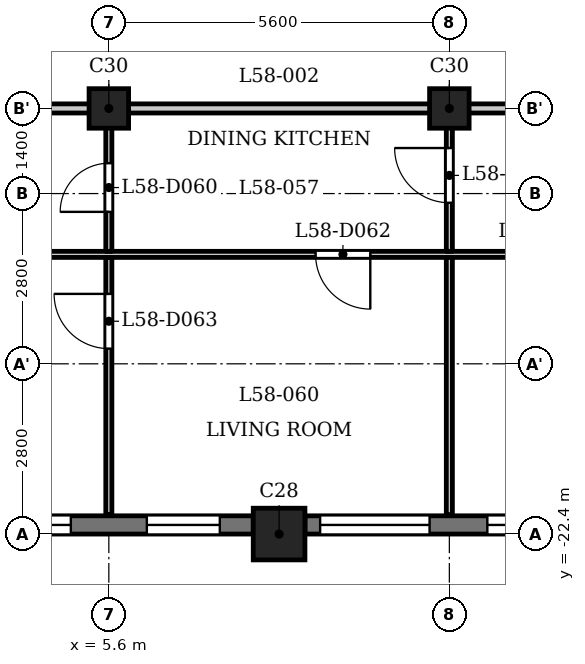
"""IFC4 building model, lengths in metres.
Left out: names, types, materials, properties, quantities, classifications, styles, units other than length and angle.
Written with IfcOpenShell. Run it as: python <this file> out.ifc"""

import sys

from ifc_helpers import new_model, si_unit, direction, frame, frame_2d, origin, origin_2d, place, context, subcontext, project, spatial, rectangle, extrude, element, fill, save


model = new_model("IFC4")
c1 = context("Model", 3, precision=1e-05, world=origin(), true_north=direction((0.0, 1.0)))
c2 = subcontext(c1, "Body", "Model", "MODEL_VIEW")
j1 = project(units=[si_unit("LENGTHUNIT", "METRE"), si_unit("PLANEANGLEUNIT", "RADIAN")], contexts=[c1])
p1 = place(None, origin())
s1 = spatial("IfcSite", under=j1, at=p1, CompositionType="ELEMENT")
p2 = place(p1, origin())
s2 = spatial("IfcBuilding", under=s1, at=p2, CompositionType="ELEMENT")
p3 = place(p2, frame((0.0, 0.0, 223.9)))
s3 = spatial("IfcBuildingStorey", under=s2, at=p3, CompositionType="ELEMENT", Elevation=223.9)
p4 = place(p3, frame((8.4, -22.4, 0.0), z_axis=(0.0, 0.0, 1.0), x_axis=(1.0, 0.0, 0.0)))
e1 = element("IfcColumn", 1, at=p4, inside=s3, PredefinedType="COLUMN", context=c2, shape_type="SweptSolid", body=[
    extrude(rectangle(XDim=0.85, YDim=0.85, at=origin_2d()), origin(), (0.0, 0.0, 1.0), 3.5),
])
for number, where, z_axis, x_axis in (
    (2, (5.6, -15.4, 0.0), (0.0, 0.0, 1.0), (1.0, 0.0, 0.0)),
    (3, (11.2, -15.4, 0.0), (0.0, 0.0, 1.0), (1.0, 0.0, 0.0)),
):
    element("IfcColumn", number, at=place(p3, frame(where, z_axis=z_axis, x_axis=x_axis)), inside=s3, PredefinedType="COLUMN", context=c2, shape_type="SweptSolid", body=[
        extrude(rectangle(XDim=0.65, YDim=0.65, at=origin_2d()), origin(), (0.0, 0.0, 1.0), 3.5),
    ])
p5 = place(p3, frame((3.225, -22.25, 0.0), z_axis=(0.0, 0.0, 1.0), x_axis=(1.0, 0.0, 0.0)))
e4 = element("IfcWall", 4, at=p5, inside=s3, PredefinedType="SOLIDWALL", context=c2, shape_type="SweptSolid", body=[
    extrude(rectangle(XDim=4.75, YDim=0.3, at=frame_2d((2.375, 0.0))), origin(), (0.0, 0.0, 1.0), 2.5),
])
p6 = place(p5, frame((0.55, 0.0, 0.6)))
e5 = element("IfcOpeningElement", 5, at=p6, cuts=e4, PredefinedType="OPENING", context=c2, shape_type="SweptSolid", body=[
    extrude(rectangle(XDim=1.2, YDim=1.55, at=frame_2d((0.6, 0.775))), frame((0.0, 0.16, 0.0), z_axis=(0.0, -1.0, 0.0), x_axis=(1.0, 0.0, 0.0)), (0.0, 0.0, 1.0), 0.32),
])
p7 = place(p5, frame((3.0, 0.0, 0.6)))
e6 = element("IfcOpeningElement", 6, at=p7, cuts=e4, PredefinedType="OPENING", context=c2, shape_type="SweptSolid", body=[
    extrude(rectangle(XDim=1.2, YDim=1.55, at=frame_2d((0.6, 0.775))), frame((0.0, 0.16, 0.0), z_axis=(0.0, -1.0, 0.0), x_axis=(1.0, 0.0, 0.0)), (0.0, 0.0, 1.0), 0.32),
])
p8 = place(p3, frame((8.825, -22.25, 0.0), z_axis=(0.0, 0.0, 1.0), x_axis=(1.0, 0.0, 0.0)))
e7 = element("IfcWall", 7, at=p8, inside=s3, PredefinedType="SOLIDWALL", context=c2, shape_type="SweptSolid", body=[
    extrude(rectangle(XDim=4.75, YDim=0.3, at=frame_2d((2.375, 0.0))), origin(), (0.0, 0.0, 1.0), 2.5),
])
p9 = place(p8, frame((0.25, 0.0, 0.9)))
e8 = element("IfcOpeningElement", 8, at=p9, cuts=e7, PredefinedType="OPENING", context=c2, shape_type="SweptSolid", body=[
    extrude(rectangle(XDim=1.8, YDim=1.25, at=frame_2d((0.9, 0.625))), frame((0.0, 0.16, 0.0), z_axis=(0.0, -1.0, 0.0), x_axis=(1.0, 0.0, 0.0)), (0.0, 0.0, 1.0), 0.32),
])
p10 = place(p8, frame((3.0, 0.0, 0.6)))
e9 = element("IfcOpeningElement", 9, at=p10, cuts=e7, PredefinedType="OPENING", context=c2, shape_type="SweptSolid", body=[
    extrude(rectangle(XDim=1.2, YDim=1.55, at=frame_2d((0.6, 0.775))), frame((0.0, 0.16, 0.0), z_axis=(0.0, -1.0, 0.0), x_axis=(1.0, 0.0, 0.0)), (0.0, 0.0, 1.0), 0.32),
])
p11 = place(p3, frame((-23.594, -17.8, 0.0), z_axis=(0.0, 0.0, 1.0), x_axis=(1.0, 0.0, 0.0)))
e10 = element("IfcWall", 10, at=p11, inside=s3, PredefinedType="PARTITIONING", context=c2, shape_type="SweptSolid", body=[
    extrude(rectangle(XDim=47.188, YDim=0.1, at=frame_2d((23.594, 0.0))), origin(), (0.0, 0.0, 1.0), 3.2),
])
p12 = place(p11, frame((5.094, 0.0, 0.0)))
e11 = element("IfcOpeningElement", 11, at=p12, cuts=e10, PredefinedType="OPENING", context=c2, shape_type="SweptSolid", body=[
    extrude(rectangle(XDim=0.8, YDim=2.1, at=frame_2d((0.4, 1.05))), frame((0.0, 0.06, 0.0), z_axis=(0.0, -1.0, 0.0), x_axis=(1.0, 0.0, 0.0)), (0.0, 0.0, 1.0), 0.12),
])
p13 = place(p11, frame((1.126, 0.0, 0.0)))
e12 = element("IfcOpeningElement", 12, at=p13, cuts=e10, PredefinedType="OPENING", context=c2, shape_type="SweptSolid", body=[
    extrude(rectangle(XDim=0.9, YDim=2.1, at=frame_2d((0.45, 1.05))), frame((0.0, 0.06, 0.0), z_axis=(0.0, -1.0, 0.0), x_axis=(1.0, 0.0, 0.0)), (0.0, 0.0, 1.0), 0.12),
])
p14 = place(p11, frame((9.944, 0.0, 0.0)))
e13 = element("IfcOpeningElement", 13, at=p14, cuts=e10, PredefinedType="OPENING", context=c2, shape_type="SweptSolid", body=[
    extrude(rectangle(XDim=0.8, YDim=2.1, at=frame_2d((0.4, 1.05))), frame((0.0, 0.06, 0.0), z_axis=(0.0, -1.0, 0.0), x_axis=(1.0, 0.0, 0.0)), (0.0, 0.0, 1.0), 0.12),
])
p15 = place(p11, frame((7.444, 0.0, 0.0)))
e14 = element("IfcOpeningElement", 14, at=p15, cuts=e10, PredefinedType="OPENING", context=c2, shape_type="SweptSolid", body=[
    extrude(rectangle(XDim=0.9, YDim=2.1, at=frame_2d((0.45, 1.05))), frame((0.0, 0.06, 0.0), z_axis=(0.0, -1.0, 0.0), x_axis=(1.0, 0.0, 0.0)), (0.0, 0.0, 1.0), 0.12),
])
p16 = place(p11, frame((16.544, 0.0, 0.0)))
e15 = element("IfcOpeningElement", 15, at=p16, cuts=e10, PredefinedType="OPENING", context=c2, shape_type="SweptSolid", body=[
    extrude(rectangle(XDim=0.8, YDim=2.1, at=frame_2d((0.4, 1.05))), frame((0.0, 0.06, 0.0), z_axis=(0.0, -1.0, 0.0), x_axis=(1.0, 0.0, 0.0)), (0.0, 0.0, 1.0), 0.12),
])
p17 = place(p11, frame((13.294, 0.0, 0.0)))
e16 = element("IfcOpeningElement", 16, at=p17, cuts=e10, PredefinedType="OPENING", context=c2, shape_type="SweptSolid", body=[
    extrude(rectangle(XDim=0.9, YDim=2.1, at=frame_2d((0.45, 1.05))), frame((0.0, 0.06, 0.0), z_axis=(0.0, -1.0, 0.0), x_axis=(1.0, 0.0, 0.0)), (0.0, 0.0, 1.0), 0.12),
])
p18 = place(p11, frame((21.144, 0.0, 0.0)))
e17 = element("IfcOpeningElement", 17, at=p18, cuts=e10, PredefinedType="OPENING", context=c2, shape_type="SweptSolid", body=[
    extrude(rectangle(XDim=0.8, YDim=2.1, at=frame_2d((0.4, 1.05))), frame((0.0, 0.06, 0.0), z_axis=(0.0, -1.0, 0.0), x_axis=(1.0, 0.0, 0.0)), (0.0, 0.0, 1.0), 0.12),
])
p19 = place(p11, frame((18.894, 0.0, 0.0)))
e18 = element("IfcOpeningElement", 18, at=p19, cuts=e10, PredefinedType="OPENING", context=c2, shape_type="SweptSolid", body=[
    extrude(rectangle(XDim=0.9, YDim=2.1, at=frame_2d((0.45, 1.05))), frame((0.0, 0.06, 0.0), z_axis=(0.0, -1.0, 0.0), x_axis=(1.0, 0.0, 0.0)), (0.0, 0.0, 1.0), 0.12),
])
p20 = place(p11, frame((35.944, 0.0, 0.0)))
e19 = element("IfcOpeningElement", 19, at=p20, cuts=e10, PredefinedType="OPENING", context=c2, shape_type="SweptSolid", body=[
    extrude(rectangle(XDim=0.9, YDim=2.1, at=frame_2d((0.45, 1.05))), frame((0.0, 0.06, 0.0), z_axis=(0.0, -1.0, 0.0), x_axis=(1.0, 0.0, 0.0)), (0.0, 0.0, 1.0), 0.12),
])
p21 = place(p11, frame((32.594, 0.0, 0.0)))
e20 = element("IfcOpeningElement", 20, at=p21, cuts=e10, PredefinedType="OPENING", context=c2, shape_type="SweptSolid", body=[
    extrude(rectangle(XDim=0.9, YDim=2.1, at=frame_2d((0.45, 1.05))), frame((0.0, 0.06, 0.0), z_axis=(0.0, -1.0, 0.0), x_axis=(1.0, 0.0, 0.0)), (0.0, 0.0, 1.0), 0.12),
])
p22 = place(p11, frame((40.944, 0.0, 0.0)))
e21 = element("IfcOpeningElement", 21, at=p22, cuts=e10, PredefinedType="OPENING", context=c2, shape_type="SweptSolid", body=[
    extrude(rectangle(XDim=0.8, YDim=2.1, at=frame_2d((0.4, 1.05))), frame((0.0, 0.06, 0.0), z_axis=(0.0, -1.0, 0.0), x_axis=(1.0, 0.0, 0.0)), (0.0, 0.0, 1.0), 0.12),
])
p23 = place(p11, frame((45.444, 0.0, 0.0)))
e22 = element("IfcOpeningElement", 22, at=p23, cuts=e10, PredefinedType="OPENING", context=c2, shape_type="SweptSolid", body=[
    extrude(rectangle(XDim=0.9, YDim=2.1, at=frame_2d((0.45, 1.05))), frame((0.0, 0.06, 0.0), z_axis=(0.0, -1.0, 0.0), x_axis=(1.0, 0.0, 0.0)), (0.0, 0.0, 1.0), 0.12),
])
p24 = place(p3, frame((-24.684, -15.4, 0.0), z_axis=(0.0, 0.0, 1.0), x_axis=(1.0, 0.0, 0.0)))
e23 = element("IfcWall", 23, at=p24, inside=s3, PredefinedType="PARTITIONING", context=c2, shape_type="SweptSolid", body=[
    extrude(rectangle(XDim=49.368, YDim=0.15, at=frame_2d((24.684, 0.0))), origin(), (0.0, 0.0, 1.0), 3.2),
])
p25 = place(p24, frame((1.143, 0.0, 0.0)))
e24 = element("IfcOpeningElement", 24, at=p25, cuts=e23, PredefinedType="OPENING", context=c2, shape_type="SweptSolid", body=[
    extrude(rectangle(XDim=1.0, YDim=2.1, at=frame_2d((0.5, 1.05))), frame((0.0, 0.085, 0.0), z_axis=(0.0, -1.0, 0.0), x_axis=(1.0, 0.0, 0.0)), (0.0, 0.0, 1.0), 0.17),
])
p26 = place(p24, frame((8.534, 0.0, 0.0)))
e25 = element("IfcOpeningElement", 25, at=p26, cuts=e23, PredefinedType="OPENING", context=c2, shape_type="SweptSolid", body=[
    extrude(rectangle(XDim=1.0, YDim=2.1, at=frame_2d((0.5, 1.05))), frame((0.0, 0.085, 0.0), z_axis=(0.0, -1.0, 0.0), x_axis=(1.0, 0.0, 0.0)), (0.0, 0.0, 1.0), 0.17),
])
p27 = place(p24, frame((15.384, 0.0, 0.0)))
e26 = element("IfcOpeningElement", 26, at=p27, cuts=e23, PredefinedType="OPENING", context=c2, shape_type="SweptSolid", body=[
    extrude(rectangle(XDim=1.0, YDim=2.1, at=frame_2d((0.5, 1.05))), frame((0.0, 0.085, 0.0), z_axis=(0.0, -1.0, 0.0), x_axis=(1.0, 0.0, 0.0)), (0.0, 0.0, 1.0), 0.17),
])
p28 = place(p24, frame((19.984, 0.0, 0.0)))
e27 = element("IfcOpeningElement", 27, at=p28, cuts=e23, PredefinedType="OPENING", context=c2, shape_type="SweptSolid", body=[
    extrude(rectangle(XDim=1.0, YDim=2.1, at=frame_2d((0.5, 1.05))), frame((0.0, 0.085, 0.0), z_axis=(0.0, -1.0, 0.0), x_axis=(1.0, 0.0, 0.0)), (0.0, 0.0, 1.0), 0.17),
])
p29 = place(p24, frame((39.784, 0.0, 0.0)))
e28 = element("IfcOpeningElement", 28, at=p29, cuts=e23, PredefinedType="OPENING", context=c2, shape_type="SweptSolid", body=[
    extrude(rectangle(XDim=1.0, YDim=2.1, at=frame_2d((0.5, 1.05))), frame((0.0, 0.085, 0.0), z_axis=(0.0, -1.0, 0.0), x_axis=(1.0, 0.0, 0.0)), (0.0, 0.0, 1.0), 0.17),
])
p30 = place(p24, frame((47.384, 0.0, 0.0)))
e29 = element("IfcOpeningElement", 29, at=p30, cuts=e23, PredefinedType="OPENING", context=c2, shape_type="SweptSolid", body=[
    extrude(rectangle(XDim=1.0, YDim=2.1, at=frame_2d((0.5, 1.05))), frame((0.0, 0.085, 0.0), z_axis=(0.0, -1.0, 0.0), x_axis=(1.0, 0.0, 0.0)), (0.0, 0.0, 1.0), 0.17),
])
p31 = place(p3, frame((5.6, -22.08, 0.0), z_axis=(0.0, 0.0, 1.0), x_axis=(0.0, 1.0, 0.0)))
e30 = element("IfcWall", 30, at=p31, inside=s3, PredefinedType="PARTITIONING", context=c2, shape_type="SweptSolid", body=[
    extrude(rectangle(XDim=4.23, YDim=0.1, at=frame_2d((2.115, 0.0))), origin(), (0.0, 0.0, 1.0), 3.2),
])
p32 = place(p31, frame((2.73, 0.0, 0.0)))
e31 = element("IfcOpeningElement", 31, at=p32, cuts=e30, PredefinedType="OPENING", context=c2, shape_type="SweptSolid", body=[
    extrude(rectangle(XDim=0.9, YDim=2.1, at=frame_2d((0.45, 1.05))), frame((0.0, 0.06, 0.0), z_axis=(0.0, -1.0, 0.0), x_axis=(1.0, 0.0, 0.0)), (0.0, 0.0, 1.0), 0.12),
])
p33 = place(p3, frame((5.6, -17.75, 0.0), z_axis=(0.0, 0.0, 1.0), x_axis=(0.0, 1.0, 0.0)))
e32 = element("IfcWall", 32, at=p33, inside=s3, PredefinedType="PARTITIONING", context=c2, shape_type="SweptSolid", body=[
    extrude(rectangle(XDim=2.275, YDim=0.1, at=frame_2d((1.137, 0.0))), origin(), (0.0, 0.0, 1.0), 3.2),
])
p34 = place(p33, frame((0.649, 0.0, 0.0)))
e33 = element("IfcOpeningElement", 33, at=p34, cuts=e32, PredefinedType="OPENING", context=c2, shape_type="SweptSolid", body=[
    extrude(rectangle(XDim=0.8, YDim=2.1, at=frame_2d((0.4, 1.05))), frame((0.0, 0.06, 0.0), z_axis=(0.0, -1.0, 0.0), x_axis=(1.0, 0.0, 0.0)), (0.0, 0.0, 1.0), 0.12),
])
p35 = place(p3, frame((11.2, -22.08, 0.0), z_axis=(0.0, 0.0, 1.0), x_axis=(0.0, 1.0, 0.0)))
e34 = element("IfcWall", 34, at=p35, inside=s3, PredefinedType="PARTITIONING", context=c2, shape_type="SweptSolid", body=[
    extrude(rectangle(XDim=4.23, YDim=0.1, at=frame_2d((2.115, 0.0))), origin(), (0.0, 0.0, 1.0), 3.2),
])
p36 = place(p3, frame((11.2, -17.75, 0.0), z_axis=(0.0, 0.0, 1.0), x_axis=(0.0, 1.0, 0.0)))
e35 = element("IfcWall", 35, at=p36, inside=s3, PredefinedType="PARTITIONING", context=c2, shape_type="SweptSolid", body=[
    extrude(rectangle(XDim=2.275, YDim=0.1, at=frame_2d((1.137, 0.0))), origin(), (0.0, 0.0, 1.0), 3.2),
])
p37 = place(p36, frame((0.799, 0.0, 0.0)))
e36 = element("IfcOpeningElement", 36, at=p37, cuts=e35, PredefinedType="OPENING", context=c2, shape_type="SweptSolid", body=[
    extrude(rectangle(XDim=0.9, YDim=2.1, at=frame_2d((0.45, 1.05))), frame((0.0, 0.06, 0.0), z_axis=(0.0, -1.0, 0.0), x_axis=(1.0, 0.0, 0.0)), (0.0, 0.0, 1.0), 0.12),
])
p38 = place(p37, origin())
e37 = element("IfcDoor", 37, at=p38, inside=s3, OperationType="SINGLE_SWING_LEFT", PredefinedType="DOOR", context=c2, shape_type="SweptSolid", body=[
    extrude(rectangle(XDim=0.9, YDim=2.1, at=frame_2d((0.45, 1.05))), frame((0.0, 0.025, 0.0), z_axis=(0.0, -1.0, 0.0), x_axis=(1.0, 0.0, 0.0)), (0.0, 0.0, 1.0), 0.05),
])
fill(e36, e37)
p39 = place(p34, origin())
e38 = element("IfcDoor", 38, at=p39, inside=s3, OperationType="SINGLE_SWING_RIGHT", PredefinedType="DOOR", context=c2, shape_type="SweptSolid", body=[
    extrude(rectangle(XDim=0.8, YDim=2.1, at=frame_2d((0.4, 1.05))), frame((0.0, 0.025, 0.0), z_axis=(0.0, -1.0, 0.0), x_axis=(1.0, 0.0, 0.0)), (0.0, 0.0, 1.0), 0.05),
])
fill(e33, e38)
p40 = place(p21, origin())
e39 = element("IfcDoor", 39, at=p40, inside=s3, OperationType="SINGLE_SWING_RIGHT", PredefinedType="DOOR", context=c2, shape_type="SweptSolid", body=[
    extrude(rectangle(XDim=0.9, YDim=2.1, at=frame_2d((0.45, 1.05))), frame((0.0, 0.025, 0.0), z_axis=(0.0, -1.0, 0.0), x_axis=(1.0, 0.0, 0.0)), (0.0, 0.0, 1.0), 0.05),
])
fill(e20, e39)
p41 = place(p32, origin())
e40 = element("IfcDoor", 40, at=p41, inside=s3, OperationType="SINGLE_SWING_LEFT", PredefinedType="DOOR", context=c2, shape_type="SweptSolid", body=[
    extrude(rectangle(XDim=0.9, YDim=2.1, at=frame_2d((0.45, 1.05))), frame((0.0, 0.025, 0.0), z_axis=(0.0, -1.0, 0.0), x_axis=(1.0, 0.0, 0.0)), (0.0, 0.0, 1.0), 0.05),
])
fill(e31, e40)
p42 = place(p6, origin())
e41 = element("IfcWindow", 41, at=p42, inside=s3, PartitioningType="SINGLE_PANEL", PredefinedType="WINDOW", context=c2, shape_type="SweptSolid", body=[
    extrude(rectangle(XDim=1.2, YDim=1.55, at=frame_2d((0.6, 0.775))), frame((0.0, 0.03, 0.0), z_axis=(0.0, -1.0, 0.0), x_axis=(1.0, 0.0, 0.0)), (0.0, 0.0, 1.0), 0.06),
])
fill(e5, e41)
p43 = place(p7, origin())
e42 = element("IfcWindow", 42, at=p43, inside=s3, PartitioningType="SINGLE_PANEL", PredefinedType="WINDOW", context=c2, shape_type="SweptSolid", body=[
    extrude(rectangle(XDim=1.2, YDim=1.55, at=frame_2d((0.6, 0.775))), frame((0.0, 0.03, 0.0), z_axis=(0.0, -1.0, 0.0), x_axis=(1.0, 0.0, 0.0)), (0.0, 0.0, 1.0), 0.06),
])
fill(e6, e42)
p44 = place(p9, origin())
e43 = element("IfcWindow", 43, at=p44, inside=s3, PartitioningType="SINGLE_PANEL", PredefinedType="WINDOW", context=c2, shape_type="SweptSolid", body=[
    extrude(rectangle(XDim=1.8, YDim=1.25, at=frame_2d((0.9, 0.625))), frame((0.0, 0.03, 0.0), z_axis=(0.0, -1.0, 0.0), x_axis=(1.0, 0.0, 0.0)), (0.0, 0.0, 1.0), 0.06),
])
fill(e8, e43)
p45 = place(p10, origin())
e44 = element("IfcWindow", 44, at=p45, inside=s3, PartitioningType="SINGLE_PANEL", PredefinedType="WINDOW", context=c2, shape_type="SweptSolid", body=[
    extrude(rectangle(XDim=1.2, YDim=1.55, at=frame_2d((0.6, 0.775))), frame((0.0, 0.03, 0.0), z_axis=(0.0, -1.0, 0.0), x_axis=(1.0, 0.0, 0.0)), (0.0, 0.0, 1.0), 0.06),
])
fill(e9, e44)
save(model, sys.argv[1])
